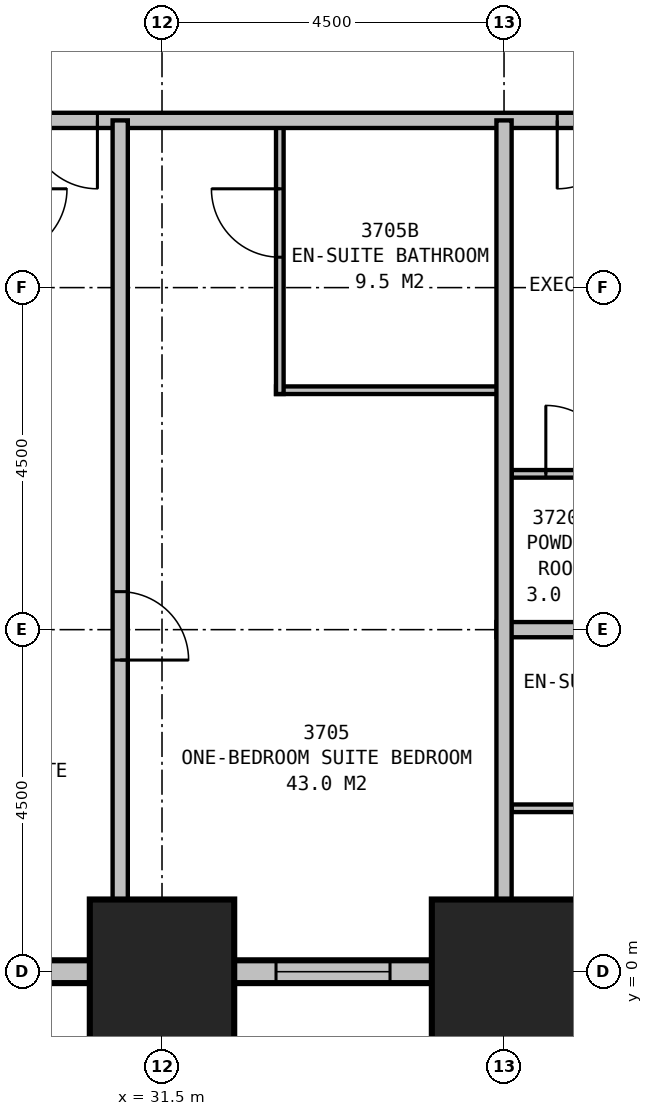
"""IFC4 building model, lengths in metres.
Left out: names, types, materials, properties, quantities, classifications, styles, units other than length and angle.
Written with IfcOpenShell. Run it as: python <this file> out.ifc"""

import sys

from ifc_helpers import new_model, si_unit, direction, frame, frame_2d, origin, origin_2d, place, context, subcontext, project, spatial, rectangle, extrude, element, fill, save


model = new_model("IFC4")
c1 = context("Model", 3, precision=1e-05, world=origin(), true_north=direction((0.0, 1.0)))
c2 = subcontext(c1, "Body", "Model", "MODEL_VIEW")
j1 = project(units=[si_unit("LENGTHUNIT", "METRE"), si_unit("PLANEANGLEUNIT", "RADIAN")], contexts=[c1])
p1 = place(None, origin())
s1 = spatial("IfcSite", under=j1, at=p1, CompositionType="ELEMENT")
p2 = place(p1, origin())
s2 = spatial("IfcBuilding", under=s1, at=p2, CompositionType="ELEMENT")
p3 = place(p2, frame((0.0, 0.0, 142.4)))
s3 = spatial("IfcBuildingStorey", under=s2, at=p3, CompositionType="ELEMENT", Elevation=142.4)
for number, where, z_axis, x_axis in (
    (1, (31.5, 0.0, 0.0), (0.0, 0.0, 1.0), (1.0, 0.0, 0.0)),
    (2, (36.0, 0.0, 0.0), (0.0, 0.0, 1.0), (1.0, 0.0, 0.0)),
):
    element("IfcColumn", number, at=place(p3, frame(where, z_axis=z_axis, x_axis=x_axis)), inside=s3, PredefinedType="COLUMN", context=c2, shape_type="SweptSolid", body=[
        extrude(rectangle(XDim=1.9, YDim=1.9, at=origin_2d()), origin(), (0.0, 0.0, 1.0), 3.5),
    ])
p4 = place(p3, frame((4.35, 0.0, 0.0), z_axis=(0.0, 0.0, 1.0), x_axis=(1.0, 0.0, 0.0)))
e3 = element("IfcWall", 3, at=p4, inside=s3, PredefinedType="STANDARD", context=c2, shape_type="SweptSolid", body=[
    extrude(rectangle(XDim=40.8, YDim=0.3, at=frame_2d((20.4, 0.0))), origin(), (0.0, 0.0, 1.0), 2.1),
])
p5 = place(p4, frame((1.65, 0.0, 0.5)))
e4 = element("IfcOpeningElement", 4, at=p5, cuts=e3, PredefinedType="OPENING", context=c2, shape_type="SweptSolid", body=[
    extrude(rectangle(XDim=1.5, YDim=1.4, at=frame_2d((0.75, 0.7))), frame((0.0, 0.16, 0.0), z_axis=(0.0, -1.0, 0.0), x_axis=(1.0, 0.0, 0.0)), (0.0, 0.0, 1.0), 0.32),
])
p6 = place(p4, frame((6.15, 0.0, 0.5)))
e5 = element("IfcOpeningElement", 5, at=p6, cuts=e3, PredefinedType="OPENING", context=c2, shape_type="SweptSolid", body=[
    extrude(rectangle(XDim=1.5, YDim=1.4, at=frame_2d((0.75, 0.7))), frame((0.0, 0.16, 0.0), z_axis=(0.0, -1.0, 0.0), x_axis=(1.0, 0.0, 0.0)), (0.0, 0.0, 1.0), 0.32),
])
p7 = place(p4, frame((10.65, 0.0, 0.5)))
e6 = element("IfcOpeningElement", 6, at=p7, cuts=e3, PredefinedType="OPENING", context=c2, shape_type="SweptSolid", body=[
    extrude(rectangle(XDim=1.5, YDim=1.4, at=frame_2d((0.75, 0.7))), frame((0.0, 0.16, 0.0), z_axis=(0.0, -1.0, 0.0), x_axis=(1.0, 0.0, 0.0)), (0.0, 0.0, 1.0), 0.32),
])
p8 = place(p4, frame((15.15, 0.0, 0.5)))
e7 = element("IfcOpeningElement", 7, at=p8, cuts=e3, PredefinedType="OPENING", context=c2, shape_type="SweptSolid", body=[
    extrude(rectangle(XDim=1.5, YDim=1.4, at=frame_2d((0.75, 0.7))), frame((0.0, 0.16, 0.0), z_axis=(0.0, -1.0, 0.0), x_axis=(1.0, 0.0, 0.0)), (0.0, 0.0, 1.0), 0.32),
])
p9 = place(p4, frame((19.65, 0.0, 0.5)))
e8 = element("IfcOpeningElement", 8, at=p9, cuts=e3, PredefinedType="OPENING", context=c2, shape_type="SweptSolid", body=[
    extrude(rectangle(XDim=1.5, YDim=1.4, at=frame_2d((0.75, 0.7))), frame((0.0, 0.16, 0.0), z_axis=(0.0, -1.0, 0.0), x_axis=(1.0, 0.0, 0.0)), (0.0, 0.0, 1.0), 0.32),
])
p10 = place(p4, frame((24.15, 0.0, 0.5)))
e9 = element("IfcOpeningElement", 9, at=p10, cuts=e3, PredefinedType="OPENING", context=c2, shape_type="SweptSolid", body=[
    extrude(rectangle(XDim=1.5, YDim=1.4, at=frame_2d((0.75, 0.7))), frame((0.0, 0.16, 0.0), z_axis=(0.0, -1.0, 0.0), x_axis=(1.0, 0.0, 0.0)), (0.0, 0.0, 1.0), 0.32),
])
p11 = place(p4, frame((28.65, 0.0, 0.5)))
e10 = element("IfcOpeningElement", 10, at=p11, cuts=e3, PredefinedType="OPENING", context=c2, shape_type="SweptSolid", body=[
    extrude(rectangle(XDim=1.5, YDim=1.4, at=frame_2d((0.75, 0.7))), frame((0.0, 0.16, 0.0), z_axis=(0.0, -1.0, 0.0), x_axis=(1.0, 0.0, 0.0)), (0.0, 0.0, 1.0), 0.32),
])
p12 = place(p4, frame((33.15, 0.0, 0.5)))
e11 = element("IfcOpeningElement", 11, at=p12, cuts=e3, PredefinedType="OPENING", context=c2, shape_type="SweptSolid", body=[
    extrude(rectangle(XDim=1.5, YDim=1.4, at=frame_2d((0.75, 0.7))), frame((0.0, 0.16, 0.0), z_axis=(0.0, -1.0, 0.0), x_axis=(1.0, 0.0, 0.0)), (0.0, 0.0, 1.0), 0.32),
])
p13 = place(p4, frame((37.65, 0.0, 0.5)))
e12 = element("IfcOpeningElement", 12, at=p13, cuts=e3, PredefinedType="OPENING", context=c2, shape_type="SweptSolid", body=[
    extrude(rectangle(XDim=1.5, YDim=1.4, at=frame_2d((0.75, 0.7))), frame((0.0, 0.16, 0.0), z_axis=(0.0, -1.0, 0.0), x_axis=(1.0, 0.0, 0.0)), (0.0, 0.0, 1.0), 0.32),
])
p14 = place(p3, frame((11.2, 11.2, 0.0), z_axis=(0.0, 0.0, 1.0), x_axis=(1.0, 0.0, 0.0)))
e13 = element("IfcWall", 13, at=p14, inside=s3, PredefinedType="PARTITIONING", context=c2, shape_type="SweptSolid", body=[
    extrude(rectangle(XDim=27.1, YDim=0.2, at=frame_2d((13.55, 0.0))), origin(), (0.0, 0.0, 1.0), 3.25),
])
p15 = place(p14, frame((4.05, 0.0, 0.0), z_axis=(0.0, 0.0, 1.0), x_axis=(-1.0, 0.0, 0.0)))
e14 = element("IfcOpeningElement", 14, at=p15, cuts=e13, PredefinedType="OPENING", context=c2, shape_type="SweptSolid", body=[
    extrude(rectangle(XDim=0.9, YDim=2.1, at=frame_2d((0.45, 1.05))), frame((0.0, 0.11, 0.0), z_axis=(0.0, -1.0, 0.0), x_axis=(1.0, 0.0, 0.0)), (0.0, 0.0, 1.0), 0.22),
])
p16 = place(p14, frame((12.65, 0.0, 0.0), z_axis=(0.0, 0.0, 1.0), x_axis=(-1.0, 0.0, 0.0)))
e15 = element("IfcOpeningElement", 15, at=p16, cuts=e13, PredefinedType="OPENING", context=c2, shape_type="SweptSolid", body=[
    extrude(rectangle(XDim=1.0, YDim=2.1, at=frame_2d((0.5, 1.05))), frame((0.0, 0.11, 0.0), z_axis=(0.0, -1.0, 0.0), x_axis=(1.0, 0.0, 0.0)), (0.0, 0.0, 1.0), 0.22),
])
p17 = place(p14, frame((19.45, 0.0, 0.0), z_axis=(0.0, 0.0, 1.0), x_axis=(-1.0, 0.0, 0.0)))
e16 = element("IfcOpeningElement", 16, at=p17, cuts=e13, PredefinedType="OPENING", context=c2, shape_type="SweptSolid", body=[
    extrude(rectangle(XDim=0.9, YDim=2.1, at=frame_2d((0.45, 1.05))), frame((0.0, 0.11, 0.0), z_axis=(0.0, -1.0, 0.0), x_axis=(1.0, 0.0, 0.0)), (0.0, 0.0, 1.0), 0.22),
])
p18 = place(p14, frame((1.6, 0.0, 0.0), z_axis=(0.0, 0.0, 1.0), x_axis=(-1.0, 0.0, 0.0)))
e17 = element("IfcOpeningElement", 17, at=p18, cuts=e13, PredefinedType="OPENING", context=c2, shape_type="SweptSolid", body=[
    extrude(rectangle(XDim=0.9, YDim=2.1, at=frame_2d((0.45, 1.05))), frame((0.0, 0.11, 0.0), z_axis=(0.0, -1.0, 0.0), x_axis=(1.0, 0.0, 0.0)), (0.0, 0.0, 1.0), 0.22),
])
p19 = place(p14, frame((26.4, 0.0, 0.0), z_axis=(0.0, 0.0, 1.0), x_axis=(-1.0, 0.0, 0.0)))
e18 = element("IfcOpeningElement", 18, at=p19, cuts=e13, PredefinedType="OPENING", context=c2, shape_type="SweptSolid", body=[
    extrude(rectangle(XDim=0.9, YDim=2.1, at=frame_2d((0.45, 1.05))), frame((0.0, 0.11, 0.0), z_axis=(0.0, -1.0, 0.0), x_axis=(1.0, 0.0, 0.0)), (0.0, 0.0, 1.0), 0.22),
])
p20 = place(p3, frame((30.95, 11.2, 0.0), z_axis=(0.0, 0.0, 1.0), x_axis=(0.0, -1.0, 0.0)))
e19 = element("IfcWall", 19, at=p20, inside=s3, PredefinedType="PARTITIONING", context=c2, shape_type="SweptSolid", body=[
    extrude(rectangle(XDim=11.2, YDim=0.2, at=frame_2d((5.6, 0.0))), origin(), (0.0, 0.0, 1.0), 2.2),
])
p21 = place(p20, frame((6.2, 0.0, 0.0)))
e20 = element("IfcOpeningElement", 20, at=p21, cuts=e19, PredefinedType="OPENING", context=c2, shape_type="SweptSolid", body=[
    extrude(rectangle(XDim=0.9, YDim=2.1, at=frame_2d((0.45, 1.05))), frame((0.0, 0.11, 0.0), z_axis=(0.0, -1.0, 0.0), x_axis=(1.0, 0.0, 0.0)), (0.0, 0.0, 1.0), 0.22),
])
p22 = place(p3, frame((33.0, 7.65, 0.0), z_axis=(0.0, 0.0, 1.0), x_axis=(1.0, 0.0, 0.0)))
e21 = element("IfcWall", 21, at=p22, inside=s3, PredefinedType="PLUMBINGWALL", context=c2, shape_type="SweptSolid", body=[
    extrude(rectangle(XDim=3.0, YDim=0.1, at=frame_2d((1.5, 0.0))), origin(), (0.0, 0.0, 1.0), 3.25),
])
p23 = place(p3, frame((33.05, 11.2, 0.0), z_axis=(0.0, 0.0, 1.0), x_axis=(0.0, -1.0, 0.0)))
e22 = element("IfcWall", 22, at=p23, inside=s3, PredefinedType="PLUMBINGWALL", context=c2, shape_type="SweptSolid", body=[
    extrude(rectangle(XDim=3.6, YDim=0.1, at=frame_2d((1.8, 0.0))), origin(), (0.0, 0.0, 1.0), 3.25),
])
p24 = place(p23, frame((1.8, 0.0, 0.0), z_axis=(0.0, 0.0, 1.0), x_axis=(-1.0, 0.0, 0.0)))
e23 = element("IfcOpeningElement", 23, at=p24, cuts=e22, PredefinedType="OPENING", context=c2, shape_type="SweptSolid", body=[
    extrude(rectangle(XDim=0.9, YDim=2.1, at=frame_2d((0.45, 1.05))), frame((0.0, 0.06, 0.0), z_axis=(0.0, -1.0, 0.0), x_axis=(1.0, 0.0, 0.0)), (0.0, 0.0, 1.0), 0.12),
])
p25 = place(p3, frame((36.0, 11.2, 0.0), z_axis=(0.0, 0.0, 1.0), x_axis=(0.0, -1.0, 0.0)))
e24 = element("IfcWall", 24, at=p25, inside=s3, PredefinedType="PARTITIONING", context=c2, shape_type="SweptSolid", body=[
    extrude(rectangle(XDim=11.2, YDim=0.2, at=frame_2d((5.6, 0.0))), origin(), (0.0, 0.0, 1.0), 2.2),
])
p26 = place(p3, frame((35.9, 4.5, 0.0), z_axis=(0.0, 0.0, 1.0), x_axis=(1.0, 0.0, 0.0)))
e25 = element("IfcWall", 25, at=p26, inside=s3, PredefinedType="PARTITIONING", context=c2, shape_type="SweptSolid", body=[
    extrude(rectangle(XDim=9.1, YDim=0.2, at=frame_2d((4.55, 0.0))), origin(), (0.0, 0.0, 1.0), 3.25),
])
p27 = place(p26, frame((7.1, 0.0, 0.0)))
e26 = element("IfcOpeningElement", 26, at=p27, cuts=e25, PredefinedType="OPENING", context=c2, shape_type="SweptSolid", body=[
    extrude(rectangle(XDim=0.9, YDim=2.1, at=frame_2d((0.45, 1.05))), frame((0.0, 0.11, 0.0), z_axis=(0.0, -1.0, 0.0), x_axis=(1.0, 0.0, 0.0)), (0.0, 0.0, 1.0), 0.22),
])
p28 = place(p3, frame((36.1, 6.55, 0.0), z_axis=(0.0, 0.0, 1.0), x_axis=(1.0, 0.0, 0.0)))
e27 = element("IfcWall", 27, at=p28, inside=s3, PredefinedType="PLUMBINGWALL", context=c2, shape_type="SweptSolid", body=[
    extrude(rectangle(XDim=1.8, YDim=0.1, at=frame_2d((0.9, 0.0))), origin(), (0.0, 0.0, 1.0), 3.25),
])
p29 = place(p28, frame((0.45, 0.0, 0.0)))
e28 = element("IfcOpeningElement", 28, at=p29, cuts=e27, PredefinedType="OPENING", context=c2, shape_type="SweptSolid", body=[
    extrude(rectangle(XDim=0.9, YDim=2.1, at=frame_2d((0.45, 1.05))), frame((0.0, 0.06, 0.0), z_axis=(0.0, -1.0, 0.0), x_axis=(1.0, 0.0, 0.0)), (0.0, 0.0, 1.0), 0.12),
])
p30 = place(p3, frame((36.1, 2.15, 0.0), z_axis=(0.0, 0.0, 1.0), x_axis=(1.0, 0.0, 0.0)))
e29 = element("IfcWall", 29, at=p30, inside=s3, PredefinedType="PLUMBINGWALL", context=c2, shape_type="SweptSolid", body=[
    extrude(rectangle(XDim=3.5, YDim=0.1, at=frame_2d((1.75, 0.0))), origin(), (0.0, 0.0, 1.0), 3.25),
])
p31 = place(p30, frame((1.8, 0.0, 0.0), z_axis=(0.0, 0.0, 1.0), x_axis=(-1.0, 0.0, 0.0)))
e30 = element("IfcOpeningElement", 30, at=p31, cuts=e29, PredefinedType="OPENING", context=c2, shape_type="SweptSolid", body=[
    extrude(rectangle(XDim=0.9, YDim=2.1, at=frame_2d((0.45, 1.05))), frame((0.0, 0.06, 0.0), z_axis=(0.0, -1.0, 0.0), x_axis=(1.0, 0.0, 0.0)), (0.0, 0.0, 1.0), 0.12),
])
p32 = place(p11, origin())
e31 = element("IfcWindow", 31, at=p32, inside=s3, PartitioningType="SINGLE_PANEL", PredefinedType="WINDOW", context=c2, shape_type="SweptSolid", body=[
    extrude(rectangle(XDim=1.5, YDim=1.4, at=frame_2d((0.75, 0.7))), frame((0.0, 0.03, 0.0), z_axis=(0.0, -1.0, 0.0), x_axis=(1.0, 0.0, 0.0)), (0.0, 0.0, 1.0), 0.06),
])
fill(e10, e31)
p33 = place(p17, origin())
e32 = element("IfcDoor", 32, at=p33, inside=s3, OperationType="SINGLE_SWING_LEFT", PredefinedType="DOOR", context=c2, shape_type="SweptSolid", body=[
    extrude(rectangle(XDim=0.9, YDim=2.1, at=frame_2d((0.45, 1.05))), frame((0.0, 0.025, 0.0), z_axis=(0.0, -1.0, 0.0), x_axis=(1.0, 0.0, 0.0)), (0.0, 0.0, 1.0), 0.05),
])
fill(e16, e32)
p34 = place(p19, origin())
e33 = element("IfcDoor", 33, at=p34, inside=s3, OperationType="SINGLE_SWING_RIGHT", PredefinedType="DOOR", context=c2, shape_type="SweptSolid", body=[
    extrude(rectangle(XDim=0.9, YDim=2.1, at=frame_2d((0.45, 1.05))), frame((0.0, 0.025, 0.0), z_axis=(0.0, -1.0, 0.0), x_axis=(1.0, 0.0, 0.0)), (0.0, 0.0, 1.0), 0.05),
])
fill(e18, e33)
p35 = place(p21, origin())
e34 = element("IfcDoor", 34, at=p35, inside=s3, OperationType="SINGLE_SWING_RIGHT", PredefinedType="DOOR", context=c2, shape_type="SweptSolid", body=[
    extrude(rectangle(XDim=0.9, YDim=2.1, at=frame_2d((0.45, 1.05))), frame((0.0, 0.025, 0.0), z_axis=(0.0, -1.0, 0.0), x_axis=(1.0, 0.0, 0.0)), (0.0, 0.0, 1.0), 0.05),
])
fill(e20, e34)
p36 = place(p24, origin())
e35 = element("IfcDoor", 35, at=p36, inside=s3, OperationType="SINGLE_SWING_RIGHT", PredefinedType="DOOR", context=c2, shape_type="SweptSolid", body=[
    extrude(rectangle(XDim=0.9, YDim=2.1, at=frame_2d((0.45, 1.05))), frame((0.0, 0.025, 0.0), z_axis=(0.0, -1.0, 0.0), x_axis=(1.0, 0.0, 0.0)), (0.0, 0.0, 1.0), 0.05),
])
fill(e23, e35)
p37 = place(p29, origin())
e36 = element("IfcDoor", 36, at=p37, inside=s3, OperationType="SINGLE_SWING_LEFT", PredefinedType="DOOR", context=c2, shape_type="SweptSolid", body=[
    extrude(rectangle(XDim=0.9, YDim=2.1, at=frame_2d((0.45, 1.05))), frame((0.0, 0.025, 0.0), z_axis=(0.0, -1.0, 0.0), x_axis=(1.0, 0.0, 0.0)), (0.0, 0.0, 1.0), 0.05),
])
fill(e28, e36)
save(model, sys.argv[1])
